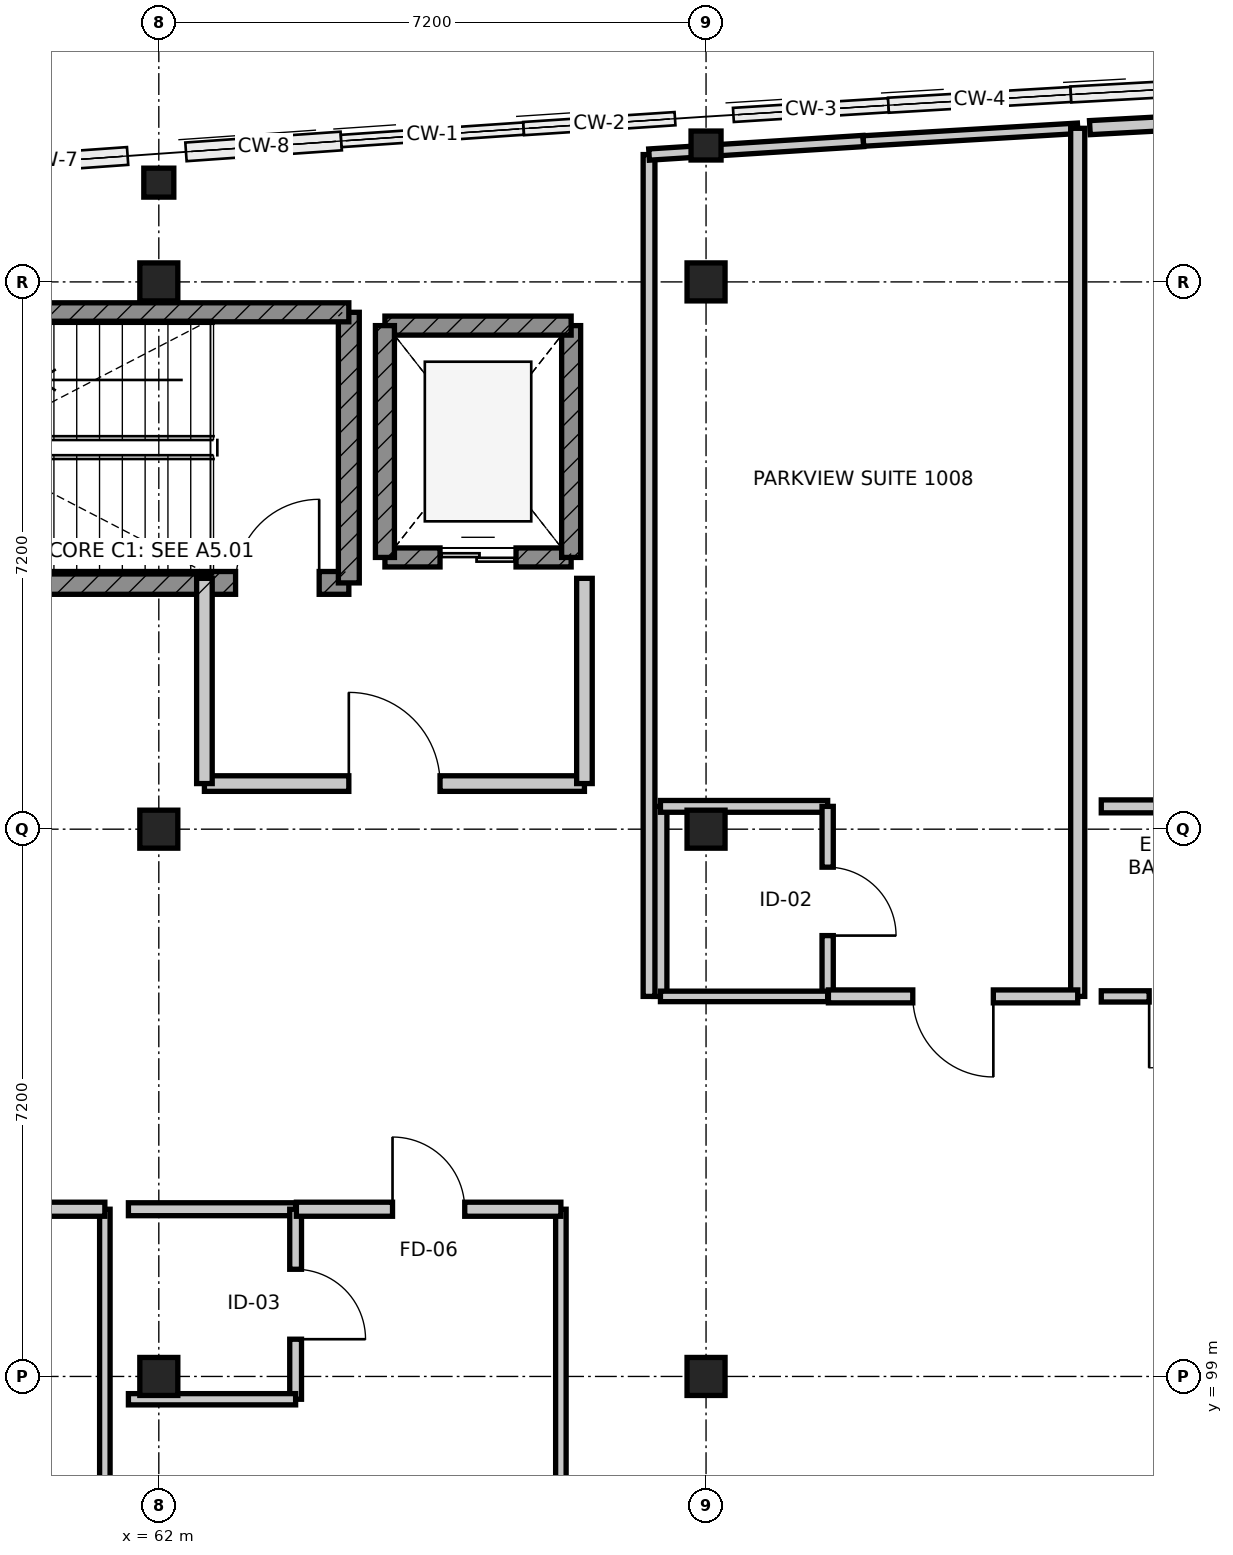
"""IFC4 building model, lengths in metres.
Left out: names, types, materials, properties, quantities, classifications, styles, units other than length and angle.
Written with IfcOpenShell. Run it as: python <this file> out.ifc"""

import sys

from ifc_helpers import new_model, si_unit, direction, frame, frame_2d, origin, origin_2d, place, context, subcontext, project, spatial, rectangle, i_section, extrude, element, fill, save


model = new_model("IFC4")
c1 = context("Model", 3, precision=1e-05, world=origin(), true_north=direction((0.0, 1.0)))
c2 = subcontext(c1, "Body", "Model", "MODEL_VIEW")
j1 = project(units=[si_unit("LENGTHUNIT", "METRE"), si_unit("PLANEANGLEUNIT", "RADIAN")], contexts=[c1])
p1 = place(None, origin())
s1 = spatial("IfcSite", under=j1, at=p1, CompositionType="ELEMENT")
p2 = place(p1, origin())
s2 = spatial("IfcBuilding", under=s1, at=p2, CompositionType="ELEMENT")
p3 = place(p2, frame((0.0, 0.0, 40.8)))
s3 = spatial("IfcBuildingStorey", under=s2, at=p3, CompositionType="ELEMENT", Elevation=40.8)
for number, where, z_axis, x_axis in (
    (1, (62.0, 99.0, 0.0), (0.0, 0.0, 1.0), (1.0, 0.0, 0.0)),
    (2, (62.0, 106.2, 0.0), (0.0, 0.0, 1.0), (1.0, 0.0, 0.0)),
    (3, (62.0, 113.4, 0.0), (0.0, 0.0, 1.0), (1.0, 0.0, 0.0)),
):
    element("IfcColumn", number, at=place(p3, frame(where, z_axis=z_axis, x_axis=x_axis)), inside=s3, PredefinedType="COLUMN", context=c2, shape_type="SweptSolid", body=[
        extrude(rectangle(XDim=0.5, YDim=0.5, at=origin_2d()), origin(), (0.0, 0.0, 1.0), 3.6),
    ])
p4 = place(p3, frame((62.0, 114.706, 0.0), z_axis=(0.0, 0.0, 1.0), x_axis=(1.0, 0.0, 0.0)))
e4 = element("IfcColumn", 4, at=p4, inside=s3, PredefinedType="COLUMN", context=c2, shape_type="SweptSolid", body=[
    extrude(i_section(OverallWidth=0.395, OverallDepth=0.381, WebThickness=0.018, FlangeThickness=0.03, FilletRadius=0.015, at=origin_2d()), origin(), (0.0, 0.0, 1.0), 3.6),
])
for number, where, z_axis, x_axis in (
    (5, (69.2, 99.0, 0.0), (0.0, 0.0, 1.0), (1.0, 0.0, 0.0)),
    (6, (69.2, 106.2, 0.0), (0.0, 0.0, 1.0), (1.0, 0.0, 0.0)),
    (7, (69.2, 113.4, 0.0), (0.0, 0.0, 1.0), (1.0, 0.0, 0.0)),
):
    element("IfcColumn", number, at=place(p3, frame(where, z_axis=z_axis, x_axis=x_axis)), inside=s3, PredefinedType="COLUMN", context=c2, shape_type="SweptSolid", body=[
        extrude(rectangle(XDim=0.5, YDim=0.5, at=origin_2d()), origin(), (0.0, 0.0, 1.0), 3.6),
    ])
p5 = place(p3, frame((69.2, 115.194, 0.0), z_axis=(0.0, 0.0, 1.0), x_axis=(1.0, 0.0, 0.0)))
e8 = element("IfcColumn", 8, at=p5, inside=s3, PredefinedType="COLUMN", context=c2, shape_type="SweptSolid", body=[
    extrude(i_section(OverallWidth=0.395, OverallDepth=0.381, WebThickness=0.018, FlangeThickness=0.03, FilletRadius=0.015, at=origin_2d()), origin(), (0.0, 0.0, 1.0), 3.6),
])
p6 = place(p3, frame((56.1, 109.44, 0.0), z_axis=(0.0, 0.0, 1.0), x_axis=(1.0, 0.0, 0.0)))
e9 = element("IfcWall", 9, at=p6, inside=s3, PredefinedType="SHEAR", context=c2, shape_type="SweptSolid", body=[
    extrude(rectangle(XDim=8.4, YDim=0.3, at=frame_2d((4.2, 0.0))), origin(), (0.0, 0.0, 1.0), 3.38),
])
p7 = place(p6, frame((6.91, 0.0, 0.0)))
e10 = element("IfcOpeningElement", 10, at=p7, cuts=e9, PredefinedType="OPENING", context=c2, shape_type="SweptSolid", body=[
    extrude(rectangle(XDim=1.1, YDim=2.1, at=frame_2d((0.55, 1.05))), frame((0.0, 0.16, 0.0), z_axis=(0.0, -1.0, 0.0), x_axis=(1.0, 0.0, 0.0)), (0.0, 0.0, 1.0), 0.32),
])
p8 = place(p3, frame((64.5, 109.44, 0.0), z_axis=(0.0, 0.0, 1.0), x_axis=(0.0, 1.0, 0.0)))
e11 = element("IfcWall", 11, at=p8, inside=s3, PredefinedType="SHEAR", context=c2, shape_type="SweptSolid", body=[
    extrude(rectangle(XDim=3.56, YDim=0.275, at=frame_2d((1.78, 0.0))), origin(), (0.0, 0.0, 1.0), 3.38),
])
p9 = place(p3, frame((64.5, 113.0, 0.0), z_axis=(0.0, 0.0, 1.0), x_axis=(-1.0, 0.0, 0.0)))
e12 = element("IfcWall", 12, at=p9, inside=s3, PredefinedType="SHEAR", context=c2, shape_type="SweptSolid", body=[
    extrude(rectangle(XDim=8.4, YDim=0.25, at=frame_2d((4.2, 0.0))), origin(), (0.0, 0.0, 1.0), 3.38),
])
p10 = place(p3, frame((64.975, 109.775, 0.0), z_axis=(0.0, 0.0, 1.0), x_axis=(1.0, 0.0, 0.0)))
e13 = element("IfcWall", 13, at=p10, inside=s3, PredefinedType="SHEAR", context=c2, shape_type="SweptSolid", body=[
    extrude(rectangle(XDim=2.45, YDim=0.25, at=frame_2d((1.225, 0.0))), origin(), (0.0, 0.0, 1.0), 3.38),
])
p11 = place(p10, frame((0.725, 0.0, 0.0)))
e14 = element("IfcOpeningElement", 14, at=p11, cuts=e13, PredefinedType="OPENING", context=c2, shape_type="SweptSolid", body=[
    extrude(rectangle(XDim=1.0, YDim=2.15, at=frame_2d((0.5, 1.075))), frame((0.0, 0.135, 0.0), z_axis=(0.0, -1.0, 0.0), x_axis=(1.0, 0.0, 0.0)), (0.0, 0.0, 1.0), 0.27),
])
p12 = place(p3, frame((67.425, 109.775, 0.0), z_axis=(0.0, 0.0, 1.0), x_axis=(0.0, 1.0, 0.0)))
e15 = element("IfcWall", 15, at=p12, inside=s3, PredefinedType="SHEAR", context=c2, shape_type="SweptSolid", body=[
    extrude(rectangle(XDim=3.05, YDim=0.25, at=frame_2d((1.525, 0.0))), origin(), (0.0, 0.0, 1.0), 3.38),
])
p13 = place(p3, frame((67.425, 112.825, 0.0), z_axis=(0.0, 0.0, 1.0), x_axis=(-1.0, 0.0, 0.0)))
e16 = element("IfcWall", 16, at=p13, inside=s3, PredefinedType="SHEAR", context=c2, shape_type="SweptSolid", body=[
    extrude(rectangle(XDim=2.45, YDim=0.25, at=frame_2d((1.225, 0.0))), origin(), (0.0, 0.0, 1.0), 3.38),
])
p14 = place(p3, frame((64.975, 112.825, 0.0), z_axis=(0.0, 0.0, 1.0), x_axis=(0.0, -1.0, 0.0)))
e17 = element("IfcWall", 17, at=p14, inside=s3, PredefinedType="SHEAR", context=c2, shape_type="SweptSolid", body=[
    extrude(rectangle(XDim=3.05, YDim=0.25, at=frame_2d((1.525, 0.0))), origin(), (0.0, 0.0, 1.0), 3.38),
])
p15 = place(p3, frame((62.6, 106.8, 0.0), z_axis=(0.0, 0.0, 1.0), x_axis=(1.0, 0.0, 0.0)))
e18 = element("IfcWall", 18, at=p15, inside=s3, PredefinedType="PARTITIONING", context=c2, shape_type="SweptSolid", body=[
    extrude(rectangle(XDim=5.0, YDim=0.205, at=frame_2d((2.5, 0.0))), origin(), (0.0, 0.0, 1.0), 3.38),
])
p16 = place(p15, frame((1.9, 0.0, 0.0)))
e19 = element("IfcOpeningElement", 19, at=p16, cuts=e18, PredefinedType="OPENING", context=c2, shape_type="SweptSolid", body=[
    extrude(rectangle(XDim=1.2, YDim=2.1, at=frame_2d((0.6, 1.05))), frame((0.0, 0.113, 0.0), z_axis=(0.0, -1.0, 0.0), x_axis=(1.0, 0.0, 0.0)), (0.0, 0.0, 1.0), 0.225),
])
for number, where, z_axis, x_axis in (
    (20, (67.6, 106.8, 0.0), (0.0, 0.0, 1.0), (0.0, 1.0, 0.0)),
    (21, (62.6, 109.5, 0.0), (0.0, 0.0, 1.0), (0.0, -1.0, 0.0)),
):
    element("IfcWall", number, at=place(p3, frame(where, z_axis=z_axis, x_axis=x_axis)), inside=s3, PredefinedType="PARTITIONING", context=c2, shape_type="SweptSolid", body=[
        extrude(rectangle(XDim=2.7, YDim=0.205, at=frame_2d((1.35, 0.0))), origin(), (0.0, 0.0, 1.0), 3.38),
    ])
p17 = place(p3, frame((61.29, 101.2, 0.0), z_axis=(0.0, 0.0, 1.0), x_axis=(0.0, -1.0, 0.0)))
e22 = element("IfcWall", 22, at=p17, inside=s3, PredefinedType="PARTITIONING", context=c2, shape_type="SweptSolid", body=[
    extrude(rectangle(XDim=9.24, YDim=0.138, at=frame_2d((4.62, 0.0))), origin(), (0.0, 0.0, 1.0), 2.765),
])
p18 = place(p3, frame((57.81, 101.2, 0.0), z_axis=(0.0, 0.0, 1.0), x_axis=(1.0, 0.0, 0.0)))
e23 = element("IfcWall", 23, at=p18, inside=s3, PredefinedType="PARTITIONING", context=c2, shape_type="SweptSolid", body=[
    extrude(rectangle(XDim=3.48, YDim=0.185, at=frame_2d((1.74, 0.0))), origin(), (0.0, 0.0, 1.0), 3.38),
])
p19 = place(p18, frame((1.21, 0.0, 0.0)))
e24 = element("IfcOpeningElement", 24, at=p19, cuts=e23, PredefinedType="OPENING", context=c2, shape_type="SweptSolid", body=[
    extrude(rectangle(XDim=1.06, YDim=2.2, at=frame_2d((0.53, 1.1))), frame((0.0, 0.103, 0.0), z_axis=(0.0, -1.0, 0.0), x_axis=(1.0, 0.0, 0.0)), (0.0, 0.0, 1.0), 0.205),
])
p20 = place(p3, frame((61.6, 101.2, 0.0), z_axis=(0.0, 0.0, 1.0), x_axis=(1.0, 0.0, 0.0)))
e25 = element("IfcWall", 25, at=p20, inside=s3, PredefinedType="PARTITIONING", context=c2, shape_type="SweptSolid", body=[
    extrude(rectangle(XDim=2.2, YDim=0.17, at=frame_2d((1.1, 0.0))), origin(), (0.0, 0.0, 1.0), 2.715),
])
p21 = place(p3, frame((63.8, 101.2, 0.0), z_axis=(0.0, 0.0, 1.0), x_axis=(0.0, -1.0, 0.0)))
e26 = element("IfcWall", 26, at=p21, inside=s3, PredefinedType="PARTITIONING", context=c2, shape_type="SweptSolid", body=[
    extrude(rectangle(XDim=2.5, YDim=0.155, at=frame_2d((1.25, 0.0))), origin(), (0.0, 0.0, 1.0), 2.765),
])
p22 = place(p21, frame((0.79, 0.0, 0.0)))
e27 = element("IfcOpeningElement", 27, at=p22, cuts=e26, PredefinedType="OPENING", context=c2, shape_type="SweptSolid", body=[
    extrude(rectangle(XDim=0.92, YDim=2.1, at=frame_2d((0.46, 1.05))), frame((0.0, 0.087, 0.0), z_axis=(0.0, -1.0, 0.0), x_axis=(1.0, 0.0, 0.0)), (0.0, 0.0, 1.0), 0.175),
])
p23 = place(p3, frame((63.8, 98.7, 0.0), z_axis=(0.0, 0.0, 1.0), x_axis=(-1.0, 0.0, 0.0)))
e28 = element("IfcWall", 28, at=p23, inside=s3, PredefinedType="PARTITIONING", context=c2, shape_type="SweptSolid", body=[
    extrude(rectangle(XDim=2.2, YDim=0.148, at=frame_2d((1.1, 0.0))), origin(), (0.0, 0.0, 1.0), 2.715),
])
p24 = place(p3, frame((67.29, 101.2, 0.0), z_axis=(0.0, 0.0, 1.0), x_axis=(0.0, -1.0, 0.0)))
e29 = element("IfcWall", 29, at=p24, inside=s3, PredefinedType="PARTITIONING", context=c2, shape_type="SweptSolid", body=[
    extrude(rectangle(XDim=9.24, YDim=0.138, at=frame_2d((4.62, 0.0))), origin(), (0.0, 0.0, 1.0), 2.765),
])
p25 = place(p3, frame((63.81, 101.2, 0.0), z_axis=(0.0, 0.0, 1.0), x_axis=(1.0, 0.0, 0.0)))
e30 = element("IfcWall", 30, at=p25, inside=s3, PredefinedType="PARTITIONING", context=c2, shape_type="SweptSolid", body=[
    extrude(rectangle(XDim=3.48, YDim=0.185, at=frame_2d((1.74, 0.0))), origin(), (0.0, 0.0, 1.0), 3.38),
])
p26 = place(p25, frame((1.265, 0.0, 0.0)))
e31 = element("IfcOpeningElement", 31, at=p26, cuts=e30, PredefinedType="OPENING", context=c2, shape_type="SweptSolid", body=[
    extrude(rectangle(XDim=0.95, YDim=2.1, at=frame_2d((0.475, 1.05))), frame((0.0, 0.103, 0.0), z_axis=(0.0, -1.0, 0.0), x_axis=(1.0, 0.0, 0.0)), (0.0, 0.0, 1.0), 0.205),
])
p27 = place(p3, frame((68.6, 104.0, 0.0), z_axis=(0.0, 0.0, 1.0), x_axis=(0.0, 1.0, 0.0)))
e32 = element("IfcWall", 32, at=p27, inside=s3, PredefinedType="PARTITIONING", context=c2, shape_type="SweptSolid", body=[
    extrude(rectangle(XDim=2.5, YDim=0.17, at=frame_2d((1.25, 0.0))), origin(), (0.0, 0.0, 1.0), 2.765),
])
p28 = place(p3, frame((68.6, 106.5, 0.0), z_axis=(0.0, 0.0, 1.0), x_axis=(1.0, 0.0, 0.0)))
e33 = element("IfcWall", 33, at=p28, inside=s3, PredefinedType="PARTITIONING", context=c2, shape_type="SweptSolid", body=[
    extrude(rectangle(XDim=2.2, YDim=0.155, at=frame_2d((1.1, 0.0))), origin(), (0.0, 0.0, 1.0), 2.715),
])
p29 = place(p3, frame((70.8, 106.5, 0.0), z_axis=(0.0, 0.0, 1.0), x_axis=(0.0, -1.0, 0.0)))
e34 = element("IfcWall", 34, at=p29, inside=s3, PredefinedType="PARTITIONING", context=c2, shape_type="SweptSolid", body=[
    extrude(rectangle(XDim=2.5, YDim=0.148, at=frame_2d((1.25, 0.0))), origin(), (0.0, 0.0, 1.0), 2.765),
])
p30 = place(p29, frame((0.8, 0.0, 0.0)))
e35 = element("IfcOpeningElement", 35, at=p30, cuts=e34, PredefinedType="OPENING", context=c2, shape_type="SweptSolid", body=[
    extrude(rectangle(XDim=0.9, YDim=2.08, at=frame_2d((0.45, 1.04))), frame((0.0, 0.084, 0.0), z_axis=(0.0, -1.0, 0.0), x_axis=(1.0, 0.0, 0.0)), (0.0, 0.0, 1.0), 0.168),
])
p31 = place(p3, frame((70.8, 104.0, 0.0), z_axis=(0.0, 0.0, 1.0), x_axis=(-1.0, 0.0, 0.0)))
e36 = element("IfcWall", 36, at=p31, inside=s3, PredefinedType="PARTITIONING", context=c2, shape_type="SweptSolid", body=[
    extrude(rectangle(XDim=2.2, YDim=0.138, at=frame_2d((1.1, 0.0))), origin(), (0.0, 0.0, 1.0), 2.715),
])
p32 = place(p3, frame((68.45, 104.0, 0.0), z_axis=(0.0, 0.0, 1.0), x_axis=(0.0, 1.0, 0.0)))
e37 = element("IfcWall", 37, at=p32, inside=s3, PredefinedType="PARTITIONING", context=c2, shape_type="SweptSolid", body=[
    extrude(rectangle(XDim=11.075, YDim=0.155, at=frame_2d((5.538, 0.0))), origin(), (0.0, 0.0, 1.0), 2.765),
])
p33 = place(p3, frame((68.45, 115.075, 0.0), z_axis=(0.0, 0.0, 1.0), x_axis=(0.998003526786, 0.06315821817, 0.0)))
e38 = element("IfcWall", 38, at=p33, inside=s3, PredefinedType="PARTITIONING", context=c2, shape_type="SweptSolid", body=[
    extrude(rectangle(XDim=2.826, YDim=0.148, at=frame_2d((1.413, 0.0))), origin(), (0.0, 0.0, 1.0), 2.956),
])
p34 = place(p3, frame((71.27, 115.254, 0.0), z_axis=(0.0, 0.0, 1.0), x_axis=(0.998251350639, 0.059112104912, 0.0)))
e39 = element("IfcWall", 39, at=p34, inside=s3, PredefinedType="PARTITIONING", context=c2, shape_type="SweptSolid", body=[
    extrude(rectangle(XDim=2.825, YDim=0.138, at=frame_2d((1.413, 0.0))), origin(), (0.0, 0.0, 1.0), 2.956),
])
p35 = place(p3, frame((74.09, 115.421, 0.0), z_axis=(0.0, 0.0, 1.0), x_axis=(0.0, -1.0, 0.0)))
e40 = element("IfcWall", 40, at=p35, inside=s3, PredefinedType="PARTITIONING", context=c2, shape_type="SweptSolid", body=[
    extrude(rectangle(XDim=11.421, YDim=0.185, at=frame_2d((5.71, 0.0))), origin(), (0.0, 0.0, 1.0), 2.765),
])
p36 = place(p3, frame((74.09, 104.0, 0.0), z_axis=(0.0, 0.0, 1.0), x_axis=(-1.0, 0.0, 0.0)))
e41 = element("IfcWall", 41, at=p36, inside=s3, PredefinedType="PARTITIONING", context=c2, shape_type="SweptSolid", body=[
    extrude(rectangle(XDim=3.28, YDim=0.17, at=frame_2d((1.64, 0.0))), origin(), (0.0, 0.0, 1.0), 3.38),
])
p37 = place(p36, frame((1.11, 0.0, 0.0)))
e42 = element("IfcOpeningElement", 42, at=p37, cuts=e41, PredefinedType="OPENING", context=c2, shape_type="SweptSolid", body=[
    extrude(rectangle(XDim=1.06, YDim=2.2, at=frame_2d((0.53, 1.1))), frame((0.0, 0.095, 0.0), z_axis=(0.0, -1.0, 0.0), x_axis=(1.0, 0.0, 0.0)), (0.0, 0.0, 1.0), 0.19),
])
p38 = place(p3, frame((74.4, 106.5, 0.0), z_axis=(0.0, 0.0, 1.0), x_axis=(1.0, 0.0, 0.0)))
e43 = element("IfcWall", 43, at=p38, inside=s3, PredefinedType="PARTITIONING", context=c2, shape_type="SweptSolid", body=[
    extrude(rectangle(XDim=1.84, YDim=0.17, at=frame_2d((0.92, 0.0))), origin(), (0.0, 0.0, 1.0), 2.715),
])
p39 = place(p3, frame((76.6, 104.0, 0.0), z_axis=(0.0, 0.0, 1.0), x_axis=(-1.0, 0.0, 0.0)))
e44 = element("IfcWall", 44, at=p39, inside=s3, PredefinedType="PARTITIONING", context=c2, shape_type="SweptSolid", body=[
    extrude(rectangle(XDim=2.2, YDim=0.148, at=frame_2d((1.1, 0.0))), origin(), (0.0, 0.0, 1.0), 2.715),
])
p40 = place(p39, frame((0.63, 0.0, 0.0)))
e45 = element("IfcOpeningElement", 45, at=p40, cuts=e44, PredefinedType="OPENING", context=c2, shape_type="SweptSolid", body=[
    extrude(rectangle(XDim=0.94, YDim=2.12, at=frame_2d((0.47, 1.06))), frame((0.0, 0.084, 0.0), z_axis=(0.0, -1.0, 0.0), x_axis=(1.0, 0.0, 0.0)), (0.0, 0.0, 1.0), 0.168),
])
p41 = place(p3, frame((74.25, 115.429, 0.0), z_axis=(0.0, 0.0, 1.0), x_axis=(0.998553333612, 0.053770251364, 0.0)))
e46 = element("IfcWall", 46, at=p41, inside=s3, PredefinedType="PARTITIONING", context=c2, shape_type="SweptSolid", body=[
    extrude(rectangle(XDim=2.824, YDim=0.185, at=frame_2d((1.412, 0.0))), origin(), (0.0, 0.0, 1.0), 2.956),
])
p42 = place(p7, origin())
e47 = element("IfcDoor", 47, at=p42, inside=s3, OperationType="SINGLE_SWING_RIGHT", PredefinedType="DOOR", context=c2, shape_type="SweptSolid", body=[
    extrude(rectangle(XDim=1.1, YDim=2.1, at=frame_2d((0.55, 1.05))), frame((0.0, 0.025, 0.0), z_axis=(0.0, -1.0, 0.0), x_axis=(1.0, 0.0, 0.0)), (0.0, 0.0, 1.0), 0.05),
])
fill(e10, e47)
p43 = place(p11, origin())
e48 = element("IfcDoor", 48, at=p43, inside=s3, OperationType="DOUBLE_DOOR_SLIDING", PredefinedType="DOOR", context=c2, shape_type="SweptSolid", body=[
    extrude(rectangle(XDim=1.0, YDim=2.15, at=frame_2d((0.5, 1.075))), frame((0.0, 0.025, 0.0), z_axis=(0.0, -1.0, 0.0), x_axis=(1.0, 0.0, 0.0)), (0.0, 0.0, 1.0), 0.05),
])
fill(e14, e48)
p44 = place(p16, origin())
e49 = element("IfcDoor", 49, at=p44, inside=s3, OperationType="SINGLE_SWING_LEFT", PredefinedType="DOOR", context=c2, shape_type="SweptSolid", body=[
    extrude(rectangle(XDim=1.2, YDim=2.1, at=frame_2d((0.6, 1.05))), frame((0.0, 0.025, 0.0), z_axis=(0.0, -1.0, 0.0), x_axis=(1.0, 0.0, 0.0)), (0.0, 0.0, 1.0), 0.05),
])
fill(e19, e49)
p45 = place(p22, origin())
e50 = element("IfcDoor", 50, at=p45, inside=s3, OperationType="SINGLE_SWING_RIGHT", PredefinedType="DOOR", context=c2, shape_type="SweptSolid", body=[
    extrude(rectangle(XDim=0.92, YDim=2.1, at=frame_2d((0.46, 1.05))), frame((0.0, 0.025, 0.0), z_axis=(0.0, -1.0, 0.0), x_axis=(1.0, 0.0, 0.0)), (0.0, 0.0, 1.0), 0.05),
])
fill(e27, e50)
p46 = place(p26, origin())
e51 = element("IfcDoor", 51, at=p46, inside=s3, OperationType="SINGLE_SWING_LEFT", PredefinedType="DOOR", context=c2, shape_type="SweptSolid", body=[
    extrude(rectangle(XDim=0.95, YDim=2.1, at=frame_2d((0.475, 1.05))), frame((0.0, 0.025, 0.0), z_axis=(0.0, -1.0, 0.0), x_axis=(1.0, 0.0, 0.0)), (0.0, 0.0, 1.0), 0.05),
])
fill(e31, e51)
p47 = place(p30, origin())
e52 = element("IfcDoor", 52, at=p47, inside=s3, OperationType="SINGLE_SWING_RIGHT", PredefinedType="DOOR", context=c2, shape_type="SweptSolid", body=[
    extrude(rectangle(XDim=0.9, YDim=2.08, at=frame_2d((0.45, 1.04))), frame((0.0, 0.025, 0.0), z_axis=(0.0, -1.0, 0.0), x_axis=(1.0, 0.0, 0.0)), (0.0, 0.0, 1.0), 0.05),
])
fill(e35, e52)
p48 = place(p37, origin())
e53 = element("IfcDoor", 53, at=p48, inside=s3, OperationType="SINGLE_SWING_LEFT", PredefinedType="DOOR", context=c2, shape_type="SweptSolid", body=[
    extrude(rectangle(XDim=1.06, YDim=2.2, at=frame_2d((0.53, 1.1))), frame((0.0, 0.025, 0.0), z_axis=(0.0, -1.0, 0.0), x_axis=(1.0, 0.0, 0.0)), (0.0, 0.0, 1.0), 0.05),
])
fill(e42, e53)
p49 = place(p40, origin())
e54 = element("IfcDoor", 54, at=p49, inside=s3, OperationType="SINGLE_SWING_RIGHT", PredefinedType="DOOR", context=c2, shape_type="SweptSolid", body=[
    extrude(rectangle(XDim=0.94, YDim=2.12, at=frame_2d((0.47, 1.06))), frame((0.0, 0.025, 0.0), z_axis=(0.0, -1.0, 0.0), x_axis=(1.0, 0.0, 0.0)), (0.0, 0.0, 1.0), 0.05),
])
fill(e45, e54)
save(model, sys.argv[1])
